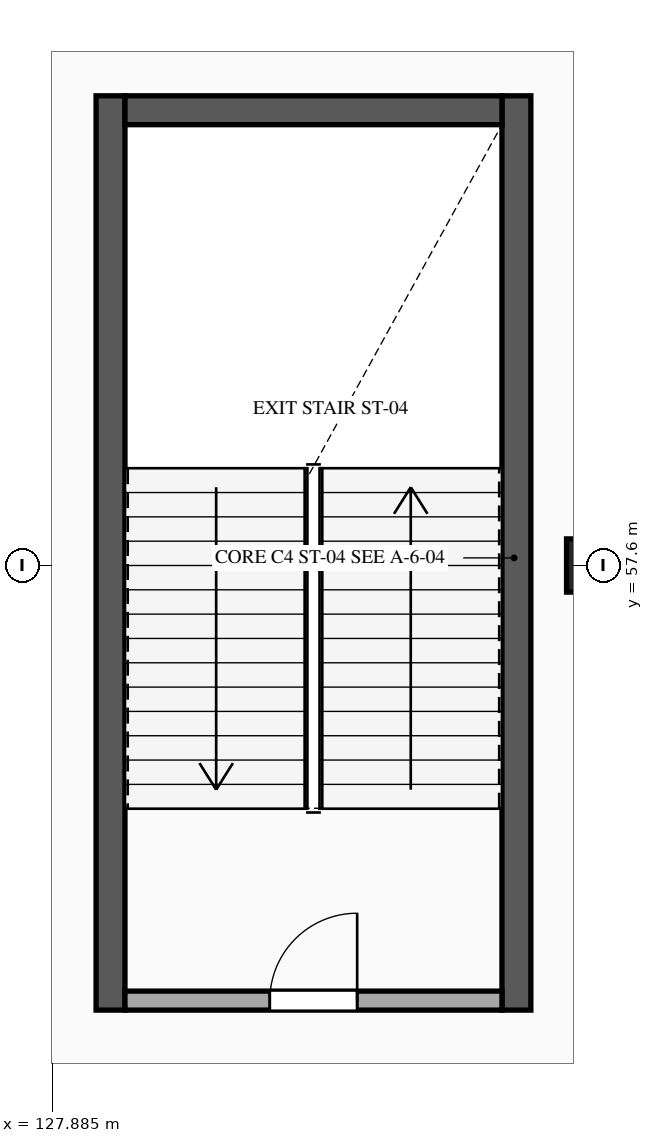
"""IFC4 building model, lengths in metres.
Left out: names, types, materials, properties, quantities, classifications, styles, units other than length and angle.
Written with IfcOpenShell. Run it as: python <this file> out.ifc"""

import sys

from ifc_helpers import new_model, si_unit, direction, frame, frame_2d, origin, origin_2d, place, context, subcontext, project, spatial, rectangle, extrude, element, fill, save


model = new_model("IFC4")
c1 = context("Model", 3, precision=1e-05, world=origin(), true_north=direction((0.0, 1.0)))
c2 = subcontext(c1, "Body", "Model", "MODEL_VIEW")
j1 = project(units=[si_unit("LENGTHUNIT", "METRE"), si_unit("PLANEANGLEUNIT", "RADIAN")], contexts=[c1])
p1 = place(None, origin())
s1 = spatial("IfcSite", under=j1, at=p1, CompositionType="ELEMENT")
p2 = place(p1, origin())
s2 = spatial("IfcBuilding", under=s1, at=p2, CompositionType="ELEMENT")
p3 = place(p2, frame((0.0, 0.0, 10.8)))
s3 = spatial("IfcBuildingStorey", under=s2, at=p3, CompositionType="ELEMENT", Elevation=10.8)
p4 = place(p3, frame((135.0, 57.6, 0.0), z_axis=(0.0, 0.0, 1.0), x_axis=(1.0, 0.0, 0.0)))
e1 = element("IfcColumn", 1, at=p4, inside=s3, PredefinedType="COLUMN", context=c2, shape_type="SweptSolid", body=[
    extrude(rectangle(XDim=0.7, YDim=0.7, at=origin_2d()), origin(), (0.0, 0.0, 1.0), 4.5),
])
for number, where, z_axis, x_axis in (
    (2, (128.65, 51.75, 0.0), (0.0, 0.0, 1.0), (0.0, 1.0, 0.0)),
    (3, (133.99, 63.78, 0.0), (0.0, 0.0, 1.0), (0.0, -1.0, 0.0)),
):
    element("IfcWall", number, at=place(p3, frame(where, z_axis=z_axis, x_axis=x_axis)), inside=s3, PredefinedType="SHEAR", context=c2, shape_type="SweptSolid", body=[
        extrude(rectangle(XDim=12.03, YDim=0.38, at=frame_2d((6.015, 0.0))), origin(), (0.0, 0.0, 1.0), 4.25),
    ])
p5 = place(p3, frame((128.84, 63.59, 0.0), z_axis=(0.0, 0.0, 1.0), x_axis=(1.0, 0.0, 0.0)))
e4 = element("IfcWall", 4, at=p5, inside=s3, PredefinedType="SHEAR", context=c2, shape_type="SweptSolid", body=[
    extrude(rectangle(XDim=4.96, YDim=0.38, at=frame_2d((2.48, 0.0))), origin(), (0.0, 0.0, 1.0), 4.25),
])
p6 = place(p3, frame((128.84, 51.875, 0.0), z_axis=(0.0, 0.0, 1.0), x_axis=(1.0, 0.0, 0.0)))
e5 = element("IfcWall", 5, at=p6, inside=s3, PredefinedType="STANDARD", context=c2, shape_type="SweptSolid", body=[
    extrude(rectangle(XDim=4.96, YDim=0.25, at=frame_2d((2.48, 0.0))), origin(), (0.0, 0.0, 1.0), 4.22),
])
p7 = place(p6, frame((1.905, 0.0, 0.0)))
e6 = element("IfcOpeningElement", 6, at=p7, cuts=e5, PredefinedType="OPENING", context=c2, shape_type="SweptSolid", body=[
    extrude(rectangle(XDim=1.15, YDim=2.2, at=frame_2d((0.575, 1.1))), frame((0.0, 0.135, 0.0), z_axis=(0.0, -1.0, 0.0), x_axis=(1.0, 0.0, 0.0)), (0.0, 0.0, 1.0), 0.27),
])
p8 = place(p7, origin())
e7 = element("IfcDoor", 7, at=p8, inside=s3, OperationType="SINGLE_SWING_RIGHT", PredefinedType="DOOR", context=c2, shape_type="SweptSolid", body=[
    extrude(rectangle(XDim=1.15, YDim=2.2, at=frame_2d((0.575, 1.1))), frame((0.0, 0.025, 0.0), z_axis=(0.0, -1.0, 0.0), x_axis=(1.0, 0.0, 0.0)), (0.0, 0.0, 1.0), 0.05),
])
fill(e6, e7)
save(model, sys.argv[1])
